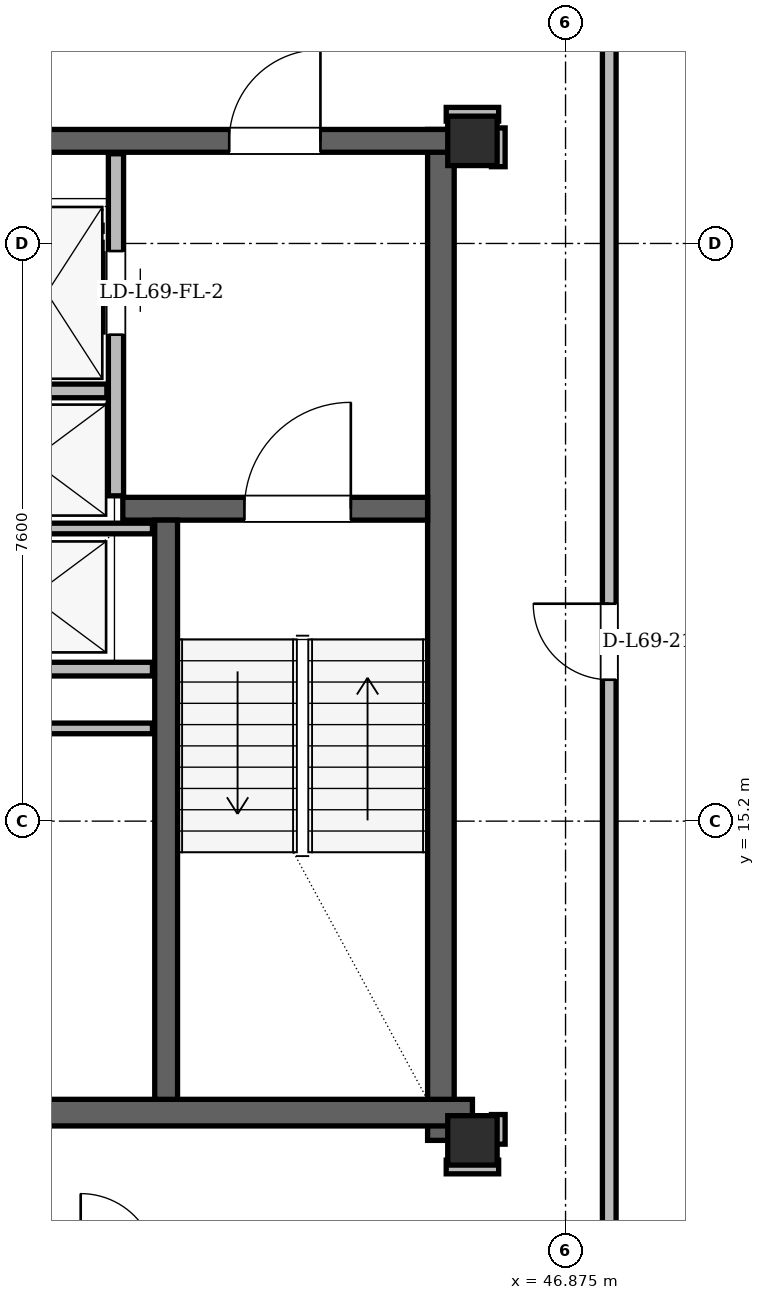
"""IFC4 building model, lengths in metres.
Left out: names, types, materials, properties, quantities, classifications, styles, units other than length and angle.
Written with IfcOpenShell. Run it as: python <this file> out.ifc"""

import sys

from ifc_helpers import new_model, si_unit, direction, frame, frame_2d, origin, origin_2d, place, context, subcontext, project, spatial, rectangle, hollow_rectangle, extrude, element, fill, save


model = new_model("IFC4")
c1 = context("Model", 3, precision=1e-05, world=origin(), true_north=direction((0.0, 1.0)))
c2 = subcontext(c1, "Body", "Model", "MODEL_VIEW")
j1 = project(units=[si_unit("LENGTHUNIT", "METRE"), si_unit("PLANEANGLEUNIT", "RADIAN")], contexts=[c1])
p1 = place(None, origin())
s1 = spatial("IfcSite", under=j1, at=p1, CompositionType="ELEMENT")
p2 = place(p1, origin())
s2 = spatial("IfcBuilding", under=s1, at=p2, CompositionType="ELEMENT")
p3 = place(p2, frame((0.0, 0.0, 261.6)))
s3 = spatial("IfcBuildingStorey", under=s2, at=p3, CompositionType="ELEMENT", Elevation=261.6)
for number, where, z_axis, x_axis in (
    (1, (45.65, 11.0, 0.0), (0.0, 0.0, 1.0), (1.0, 0.0, 0.0)),
    (2, (45.65, 24.15, 0.0), (0.0, 0.0, 1.0), (1.0, 0.0, 0.0)),
):
    element("IfcColumn", number, at=place(p3, frame(where, z_axis=z_axis, x_axis=x_axis)), inside=s3, PredefinedType="COLUMN", context=c2, shape_type="SweptSolid", body=[
        extrude(hollow_rectangle(XDim=0.65, YDim=0.65, WallThickness=0.05, at=origin_2d()), origin(), (0.0, 0.0, 1.0), 3.9),
    ])
p4 = place(p3, frame((45.235, 11.0, 0.0), z_axis=(0.0, 0.0, 1.0), x_axis=(0.0, 1.0, 0.0)))
e3 = element("IfcWall", 3, at=p4, inside=s3, PredefinedType="SHEAR", context=c2, shape_type="SweptSolid", body=[
    extrude(rectangle(XDim=13.3, YDim=0.35, at=frame_2d((6.65, 0.0))), origin(), (0.0, 0.0, 1.0), 3.68),
])
p5 = place(p3, frame((38.55, 11.365, 0.0), z_axis=(0.0, 0.0, 1.0), x_axis=(1.0, 0.0, 0.0)))
e4 = element("IfcWall", 4, at=p5, inside=s3, PredefinedType="SHEAR", context=c2, shape_type="SweptSolid", body=[
    extrude(rectangle(XDim=7.1, YDim=0.35, at=frame_2d((3.55, 0.0))), origin(), (0.0, 0.0, 1.0), 3.68),
])
p6 = place(p3, frame((29.65, 24.15, 0.0), z_axis=(0.0, 0.0, 1.0), x_axis=(1.0, 0.0, 0.0)))
e5 = element("IfcWall", 5, at=p6, inside=s3, PredefinedType="SHEAR", context=c2, shape_type="SweptSolid", body=[
    extrude(rectangle(XDim=15.7, YDim=0.3, at=frame_2d((7.85, 0.0))), origin(), (0.0, 0.0, 1.0), 3.68),
])
p7 = place(p6, frame((1.7, 0.0, 0.0)))
e6 = element("IfcOpeningElement", 6, at=p7, cuts=e5, PredefinedType="OPENING", context=c2, shape_type="SweptSolid", body=[
    extrude(rectangle(XDim=1.2, YDim=2.2, at=frame_2d((0.6, 1.1))), frame((0.0, 0.15, 0.0), z_axis=(0.0, -1.0, 0.0), x_axis=(1.0, 0.0, 0.0)), (0.0, 0.0, 1.0), 0.3),
])
p8 = place(p6, frame((12.8, 0.0, 0.0)))
e7 = element("IfcOpeningElement", 7, at=p8, cuts=e5, PredefinedType="OPENING", context=c2, shape_type="SweptSolid", body=[
    extrude(rectangle(XDim=1.2, YDim=2.2, at=frame_2d((0.6, 1.1))), frame((0.0, 0.15, 0.0), z_axis=(0.0, -1.0, 0.0), x_axis=(1.0, 0.0, 0.0)), (0.0, 0.0, 1.0), 0.3),
])
p9 = place(p6, frame((6.55, 0.0, 0.0)))
e8 = element("IfcOpeningElement", 8, at=p9, cuts=e5, PredefinedType="OPENING", context=c2, shape_type="SweptSolid", body=[
    extrude(rectangle(XDim=0.9, YDim=2.05, at=frame_2d((0.45, 1.025))), frame((0.0, 0.15, 0.0), z_axis=(0.0, -1.0, 0.0), x_axis=(1.0, 0.0, 0.0)), (0.0, 0.0, 1.0), 0.3),
])
p10 = place(p6, frame((8.45, 0.0, 0.0)))
e9 = element("IfcOpeningElement", 9, at=p10, cuts=e5, PredefinedType="OPENING", context=c2, shape_type="SweptSolid", body=[
    extrude(rectangle(XDim=0.9, YDim=2.05, at=frame_2d((0.45, 1.025))), frame((0.0, 0.15, 0.0), z_axis=(0.0, -1.0, 0.0), x_axis=(1.0, 0.0, 0.0)), (0.0, 0.0, 1.0), 0.3),
])
p11 = place(p3, frame((41.05, 19.31, 0.0), z_axis=(0.0, 0.0, 1.0), x_axis=(1.0, 0.0, 0.0)))
e10 = element("IfcWall", 10, at=p11, inside=s3, PredefinedType="SHEAR", context=c2, shape_type="SweptSolid", body=[
    extrude(rectangle(XDim=4.01, YDim=0.3, at=frame_2d((2.005, 0.0))), origin(), (0.0, 0.0, 1.0), 3.68),
])
p12 = place(p11, frame((1.6, 0.0, 0.0)))
e11 = element("IfcOpeningElement", 11, at=p12, cuts=e10, PredefinedType="OPENING", context=c2, shape_type="SweptSolid", body=[
    extrude(rectangle(XDim=1.4, YDim=2.2, at=frame_2d((0.7, 1.1))), frame((0.0, 0.15, 0.0), z_axis=(0.0, -1.0, 0.0), x_axis=(1.0, 0.0, 0.0)), (0.0, 0.0, 1.0), 0.3),
])
p13 = place(p3, frame((41.62, 11.54, 0.0), z_axis=(0.0, 0.0, 1.0), x_axis=(0.0, 1.0, 0.0)))
e12 = element("IfcWall", 12, at=p13, inside=s3, PredefinedType="SHEAR", context=c2, shape_type="SweptSolid", body=[
    extrude(rectangle(XDim=7.62, YDim=0.3, at=frame_2d((3.81, 0.0))), origin(), (0.0, 0.0, 1.0), 3.68),
])
p14 = place(p3, frame((58.652, 10.835, 0.0), z_axis=(0.0, 0.0, 1.0), x_axis=(-0.500002906693, 0.866023725598, 0.0)))
e13 = element("IfcWall", 13, at=p14, inside=s3, PredefinedType="SOLIDWALL", context=c2, shape_type="SweptSolid", body=[
    extrude(rectangle(XDim=37.2, YDim=0.29, at=frame_2d((18.6, 0.0))), origin(), (0.0, 0.0, 1.0), 3.058),
])
p15 = place(p14, frame((6.774, 0.0, 0.0)))
e14 = element("IfcOpeningElement", 14, at=p15, cuts=e13, PredefinedType="OPENING", context=c2, shape_type="SweptSolid", body=[
    extrude(rectangle(XDim=1.5, YDim=2.2, at=frame_2d((0.75, 1.1))), frame((0.0, 0.145, 0.0), z_axis=(0.0, -1.0, 0.0), x_axis=(1.0, 0.0, 0.0)), (0.0, 0.0, 1.0), 0.29),
])
p16 = place(p14, frame((32.061, 0.0, 0.0)))
e15 = element("IfcOpeningElement", 15, at=p16, cuts=e13, PredefinedType="OPENING", context=c2, shape_type="SweptSolid", body=[
    extrude(rectangle(XDim=1.5, YDim=2.2, at=frame_2d((0.75, 1.1))), frame((0.0, 0.145, 0.0), z_axis=(0.0, -1.0, 0.0), x_axis=(1.0, 0.0, 0.0)), (0.0, 0.0, 1.0), 0.29),
])
p17 = place(p14, frame((12.689, 0.0, 0.85)))
e16 = element("IfcOpeningElement", 16, at=p17, cuts=e13, PredefinedType="OPENING", context=c2, shape_type="SweptSolid", body=[
    extrude(rectangle(XDim=1.6, YDim=1.7, at=frame_2d((0.8, 0.85))), frame((0.0, 0.145, 0.0), z_axis=(0.0, -1.0, 0.0), x_axis=(1.0, 0.0, 0.0)), (0.0, 0.0, 1.0), 0.29),
])
p18 = place(p14, frame((16.599, 0.0, 0.85)))
e17 = element("IfcOpeningElement", 17, at=p18, cuts=e13, PredefinedType="OPENING", context=c2, shape_type="SweptSolid", body=[
    extrude(rectangle(XDim=3.0, YDim=2.098, at=frame_2d((1.5, 1.049))), frame((0.0, 0.145, 0.0), z_axis=(0.0, -1.0, 0.0), x_axis=(1.0, 0.0, 0.0)), (0.0, 0.0, 1.0), 0.29),
])
p19 = place(p14, frame((1.24, 0.0, 0.85)))
e18 = element("IfcOpeningElement", 18, at=p19, cuts=e13, PredefinedType="OPENING", context=c2, shape_type="SweptSolid", body=[
    extrude(rectangle(XDim=1.2, YDim=1.48, at=frame_2d((0.6, 0.74))), frame((0.0, 0.145, 0.0), z_axis=(0.0, -1.0, 0.0), x_axis=(1.0, 0.0, 0.0)), (0.0, 0.0, 1.0), 0.29),
])
p20 = place(p14, frame((3.566, 0.0, 0.85)))
e19 = element("IfcOpeningElement", 19, at=p20, cuts=e13, PredefinedType="OPENING", context=c2, shape_type="SweptSolid", body=[
    extrude(rectangle(XDim=1.2, YDim=1.48, at=frame_2d((0.6, 0.74))), frame((0.0, 0.145, 0.0), z_axis=(0.0, -1.0, 0.0), x_axis=(1.0, 0.0, 0.0)), (0.0, 0.0, 1.0), 0.29),
])
p21 = place(p14, frame((22.917, 0.0, 0.85)))
e20 = element("IfcOpeningElement", 20, at=p21, cuts=e13, PredefinedType="OPENING", context=c2, shape_type="SweptSolid", body=[
    extrude(rectangle(XDim=1.6, YDim=1.7, at=frame_2d((0.8, 0.85))), frame((0.0, 0.145, 0.0), z_axis=(0.0, -1.0, 0.0), x_axis=(1.0, 0.0, 0.0)), (0.0, 0.0, 1.0), 0.29),
])
p22 = place(p14, frame((27.025, 0.0, 0.85)))
e21 = element("IfcOpeningElement", 21, at=p22, cuts=e13, PredefinedType="OPENING", context=c2, shape_type="SweptSolid", body=[
    extrude(rectangle(XDim=3.0, YDim=2.098, at=frame_2d((1.5, 1.049))), frame((0.0, 0.145, 0.0), z_axis=(0.0, -1.0, 0.0), x_axis=(1.0, 0.0, 0.0)), (0.0, 0.0, 1.0), 0.29),
])
p23 = place(p14, frame((34.508, 0.0, 0.85)))
e22 = element("IfcOpeningElement", 22, at=p23, cuts=e13, PredefinedType="OPENING", context=c2, shape_type="SweptSolid", body=[
    extrude(rectangle(XDim=1.2, YDim=1.48, at=frame_2d((0.6, 0.74))), frame((0.0, 0.145, 0.0), z_axis=(0.0, -1.0, 0.0), x_axis=(1.0, 0.0, 0.0)), (0.0, 0.0, 1.0), 0.29),
])
p24 = place(p3, frame((40.96, 19.48, 0.0), z_axis=(0.0, 0.0, 1.0), x_axis=(0.0, 1.0, 0.0)))
e23 = element("IfcWall", 23, at=p24, inside=s3, PredefinedType="PARTITIONING", context=c2, shape_type="SweptSolid", body=[
    extrude(rectangle(XDim=4.5, YDim=0.2, at=frame_2d((2.25, 0.0))), origin(), (0.0, 0.0, 1.0), 3.68),
])
p25 = place(p24, frame((2.12, 0.0, 0.0)))
e24 = element("IfcOpeningElement", 24, at=p25, cuts=e23, PredefinedType="OPENING", context=c2, shape_type="SweptSolid", body=[
    extrude(rectangle(XDim=1.1, YDim=2.2, at=frame_2d((0.55, 1.1))), frame((0.0, 0.1, 0.0), z_axis=(0.0, -1.0, 0.0), x_axis=(1.0, 0.0, 0.0)), (0.0, 0.0, 1.0), 0.2),
])
p26 = place(p3, frame((39.26, 20.86, 0.0), z_axis=(0.0, 0.0, 1.0), x_axis=(1.0, 0.0, 0.0)))
e25 = element("IfcWall", 25, at=p26, inside=s3, PredefinedType="PARTITIONING", context=c2, shape_type="SweptSolid", body=[
    extrude(rectangle(XDim=1.58, YDim=0.18, at=frame_2d((0.79, 0.0))), origin(), (0.0, 0.0, 1.0), 3.68),
])
p27 = place(p3, frame((38.78, 17.2, 0.0), z_axis=(0.0, 0.0, 1.0), x_axis=(1.0, 0.0, 0.0)))
e26 = element("IfcWall", 26, at=p27, inside=s3, PredefinedType="PARTITIONING", context=c2, shape_type="SweptSolid", body=[
    extrude(rectangle(XDim=2.66, YDim=0.18, at=frame_2d((1.33, 0.0))), origin(), (0.0, 0.0, 1.0), 3.68),
])
for number, where, z_axis, x_axis in (
    (27, (38.78, 19.05, 0.0), (0.0, 0.0, 1.0), (1.0, 0.0, 0.0)),
    (28, (38.78, 16.42, 0.0), (0.0, 0.0, 1.0), (1.0, 0.0, 0.0)),
):
    element("IfcWall", number, at=place(p3, frame(where, z_axis=z_axis, x_axis=x_axis)), inside=s3, PredefinedType="PARTITIONING", context=c2, shape_type="SweptSolid", body=[
        extrude(rectangle(XDim=2.66, YDim=0.14, at=frame_2d((1.33, 0.0))), origin(), (0.0, 0.0, 1.0), 3.68),
    ])
p28 = place(p3, frame((45.305, 10.65, 0.0), z_axis=(0.0, 0.0, 1.0), x_axis=(1.0, 0.0, 0.0)))
e29 = element("IfcWall", 29, at=p28, inside=s3, PredefinedType="PARTITIONING", context=c2, shape_type="SweptSolid", body=[
    extrude(rectangle(XDim=0.69, YDim=0.18, at=frame_2d((0.345, 0.0))), origin(), (0.0, 0.0, 1.0), 3.68),
])
p29 = place(p3, frame((45.305, 24.5, 0.0), z_axis=(0.0, 0.0, 1.0), x_axis=(1.0, 0.0, 0.0)))
e30 = element("IfcWall", 30, at=p29, inside=s3, PredefinedType="PARTITIONING", context=c2, shape_type="SweptSolid", body=[
    extrude(rectangle(XDim=0.69, YDim=0.18, at=frame_2d((0.345, 0.0))), origin(), (0.0, 0.0, 1.0), 3.266),
])
p30 = place(p3, frame((45.99, 10.95, 0.0), z_axis=(0.0, 0.0, 1.0), x_axis=(0.0, 1.0, 0.0)))
e31 = element("IfcWall", 31, at=p30, inside=s3, PredefinedType="PARTITIONING", context=c2, shape_type="SweptSolid", body=[
    extrude(rectangle(XDim=0.39, YDim=0.18, at=frame_2d((0.195, 0.0))), origin(), (0.0, 0.0, 1.0), 3.68),
])
p31 = place(p3, frame((45.99, 23.81, 0.0), z_axis=(0.0, 0.0, 1.0), x_axis=(0.0, 1.0, 0.0)))
e32 = element("IfcWall", 32, at=p31, inside=s3, PredefinedType="PARTITIONING", context=c2, shape_type="SweptSolid", body=[
    extrude(rectangle(XDim=0.51, YDim=0.18, at=frame_2d((0.255, 0.0))), origin(), (0.0, 0.0, 1.0), 3.68),
])
p32 = place(p3, frame((47.45, 6.563, 0.0), z_axis=(0.0, 0.0, 1.0), x_axis=(0.0, 1.0, 0.0)))
e33 = element("IfcWall", 33, at=p32, inside=s3, PredefinedType="PARTITIONING", context=c2, shape_type="SweptSolid", body=[
    extrude(rectangle(XDim=23.376, YDim=0.18, at=frame_2d((11.688, 0.0))), origin(), (0.0, 0.0, 1.0), 3.058),
])
p33 = place(p32, frame((10.497, 0.0, 0.0)))
e34 = element("IfcOpeningElement", 34, at=p33, cuts=e33, PredefinedType="OPENING", context=c2, shape_type="SweptSolid", body=[
    extrude(rectangle(XDim=1.0, YDim=2.18, at=frame_2d((0.5, 1.09))), frame((0.0, 0.09, 0.0), z_axis=(0.0, -1.0, 0.0), x_axis=(1.0, 0.0, 0.0)), (0.0, 0.0, 1.0), 0.18),
])
p34 = place(p25, origin())
e35 = element("IfcDoor", 35, at=p34, inside=s3, OperationType="SLIDING_TO_RIGHT", PredefinedType="DOOR", context=c2, shape_type="SweptSolid", body=[
    extrude(rectangle(XDim=1.1, YDim=2.2, at=frame_2d((0.55, 1.1))), frame((0.0, 0.025, 0.0), z_axis=(0.0, -1.0, 0.0), x_axis=(1.0, 0.0, 0.0)), (0.0, 0.0, 1.0), 0.05),
])
fill(e24, e35)
p35 = place(p12, origin())
e36 = element("IfcDoor", 36, at=p35, inside=s3, OperationType="SINGLE_SWING_RIGHT", PredefinedType="DOOR", context=c2, shape_type="SweptSolid", body=[
    extrude(rectangle(XDim=1.4, YDim=2.2, at=frame_2d((0.7, 1.1))), frame((0.0, 0.025, 0.0), z_axis=(0.0, -1.0, 0.0), x_axis=(1.0, 0.0, 0.0)), (0.0, 0.0, 1.0), 0.05),
])
fill(e11, e36)
p36 = place(p8, origin())
e37 = element("IfcDoor", 37, at=p36, inside=s3, OperationType="SINGLE_SWING_RIGHT", PredefinedType="DOOR", context=c2, shape_type="SweptSolid", body=[
    extrude(rectangle(XDim=1.2, YDim=2.2, at=frame_2d((0.6, 1.1))), frame((0.0, 0.025, 0.0), z_axis=(0.0, -1.0, 0.0), x_axis=(1.0, 0.0, 0.0)), (0.0, 0.0, 1.0), 0.05),
])
fill(e7, e37)
p37 = place(p33, origin())
e38 = element("IfcDoor", 38, at=p37, inside=s3, OperationType="SINGLE_SWING_RIGHT", PredefinedType="DOOR", context=c2, shape_type="SweptSolid", body=[
    extrude(rectangle(XDim=1.0, YDim=2.18, at=frame_2d((0.5, 1.09))), frame((0.0, 0.025, 0.0), z_axis=(0.0, -1.0, 0.0), x_axis=(1.0, 0.0, 0.0)), (0.0, 0.0, 1.0), 0.05),
])
fill(e34, e38)
save(model, sys.argv[1])
